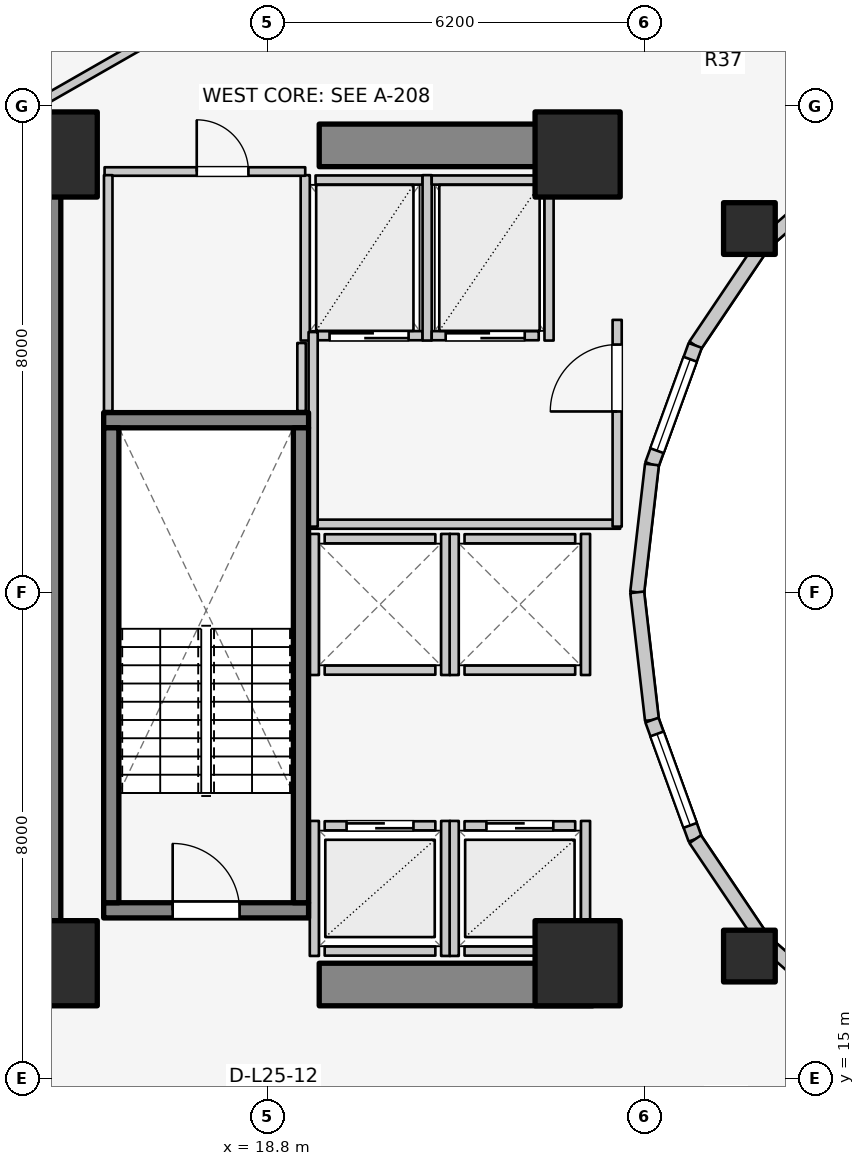
"""IFC4 building model, lengths in metres.
Left out: names, types, materials, properties, quantities, classifications, styles, units other than length and angle.
Written with IfcOpenShell. Run it as: python <this file> out.ifc"""

import sys

from ifc_helpers import new_model, si_unit, direction, frame, frame_2d, origin, origin_2d, place, context, subcontext, project, spatial, rectangle, extrude, element, fill, save


model = new_model("IFC4")
c1 = context("Model", 3, precision=1e-05, world=origin(), true_north=direction((0.0, 1.0)))
c2 = subcontext(c1, "Body", "Model", "MODEL_VIEW")
j1 = project(units=[si_unit("LENGTHUNIT", "METRE"), si_unit("PLANEANGLEUNIT", "RADIAN")], contexts=[c1])
p1 = place(None, origin())
s1 = spatial("IfcSite", under=j1, at=p1, CompositionType="ELEMENT")
p2 = place(p1, origin())
s2 = spatial("IfcBuilding", under=s1, at=p2, CompositionType="ELEMENT")
p3 = place(p2, frame((0.0, 0.0, 85.6)))
s3 = spatial("IfcBuildingStorey", under=s2, at=p3, CompositionType="ELEMENT", Elevation=85.6)
p4 = place(p3, frame((15.05, 17.05, 0.0), z_axis=(0.0, 0.0, 1.0), x_axis=(0.0, 1.0, 0.0)))
e1 = element("IfcWall", 1, at=p4, inside=s3, PredefinedType="SHEAR", context=c2, shape_type="SweptSolid", body=[
    extrude(rectangle(XDim=12.8, YDim=0.7, at=frame_2d((6.4, 0.0))), origin(), (0.0, 0.0, 1.0), 3.1),
])
for number, where, z_axis, x_axis in (
    (2, (19.65, 16.55, 0.0), (0.0, 0.0, 1.0), (1.0, 0.0, 0.0)),
    (3, (19.65, 30.35, 0.0), (0.0, 0.0, 1.0), (1.0, 0.0, 0.0)),
):
    element("IfcWall", number, at=place(p3, frame(where, z_axis=z_axis, x_axis=x_axis)), inside=s3, PredefinedType="SHEAR", context=c2, shape_type="SweptSolid", body=[
        extrude(rectangle(XDim=4.5, YDim=0.7, at=frame_2d((2.25, 0.0))), origin(), (0.0, 0.0, 1.0), 3.1),
    ])
p5 = place(p3, frame((16.105, 17.77, 0.0), z_axis=(0.0, 0.0, 1.0), x_axis=(1.0, 0.0, 0.0)))
e4 = element("IfcWall", 4, at=p5, inside=s3, PredefinedType="SOLIDWALL", context=c2, shape_type="SweptSolid", body=[
    extrude(rectangle(XDim=3.37, YDim=0.25, at=frame_2d((1.685, 0.0))), origin(), (0.0, 0.0, 1.0), 3.1),
])
p6 = place(p5, frame((1.135, 0.0, 0.0)))
e5 = element("IfcOpeningElement", 5, at=p6, cuts=e4, PredefinedType="OPENING", context=c2, shape_type="SweptSolid", body=[
    extrude(rectangle(XDim=1.1, YDim=2.1, at=frame_2d((0.55, 1.05))), frame((0.0, 0.135, 0.0), z_axis=(0.0, -1.0, 0.0), x_axis=(1.0, 0.0, 0.0)), (0.0, 0.0, 1.0), 0.27),
])
p7 = place(p3, frame((16.105, 25.83, 0.0), z_axis=(0.0, 0.0, 1.0), x_axis=(1.0, 0.0, 0.0)))
e6 = element("IfcWall", 6, at=p7, inside=s3, PredefinedType="SOLIDWALL", context=c2, shape_type="SweptSolid", body=[
    extrude(rectangle(XDim=3.37, YDim=0.25, at=frame_2d((1.685, 0.0))), origin(), (0.0, 0.0, 1.0), 3.1),
])
for number, where, z_axis, x_axis in (
    (7, (16.23, 17.895, 0.0), (0.0, 0.0, 1.0), (0.0, 1.0, 0.0)),
    (8, (19.35, 17.895, 0.0), (0.0, 0.0, 1.0), (0.0, 1.0, 0.0)),
):
    element("IfcWall", number, at=place(p3, frame(where, z_axis=z_axis, x_axis=x_axis)), inside=s3, PredefinedType="SOLIDWALL", context=c2, shape_type="SweptSolid", body=[
        extrude(rectangle(XDim=7.81, YDim=0.25, at=frame_2d((3.905, 0.0))), origin(), (0.0, 0.0, 1.0), 3.1),
    ])
for number, where, z_axis, x_axis in (
    (9, (15.3, 16.9, 0.0), (0.0, 0.0, 1.0), (1.0, 0.0, 0.0)),
    (10, (23.9, 16.9, 0.0), (0.0, 0.0, 1.0), (1.0, 0.0, 0.0)),
    (11, (23.9, 30.2, 0.0), (0.0, 0.0, 1.0), (1.0, 0.0, 0.0)),
    (12, (15.3, 30.2, 0.0), (0.0, 0.0, 1.0), (1.0, 0.0, 0.0)),
):
    element("IfcColumn", number, at=place(p3, frame(where, z_axis=z_axis, x_axis=x_axis)), inside=s3, PredefinedType="COLUMN", context=c2, shape_type="SweptSolid", body=[
        extrude(rectangle(XDim=1.4, YDim=1.4, at=origin_2d()), origin(), (0.0, 0.0, 1.0), 3.1),
    ])
for number, where, z_axis, x_axis in (
    (13, (26.725, 28.982, 0.0), (0.0, 0.0, 1.0), (1.0, 0.0, 0.0)),
    (14, (26.725, 17.018, 0.0), (0.0, 0.0, 1.0), (1.0, 0.0, 0.0)),
):
    element("IfcColumn", number, at=place(p3, frame(where, z_axis=z_axis, x_axis=x_axis)), inside=s3, PredefinedType="COLUMN", context=c2, shape_type="SweptSolid", body=[
        extrude(rectangle(XDim=0.85, YDim=0.85, at=origin_2d()), origin(), (0.0, 0.0, 1.0), 3.1),
    ])
p8 = place(p3, frame((28.44, 30.032, 0.0), z_axis=(0.0, 0.0, 1.0), x_axis=(-0.752576694707, -0.658504607869, 0.0)))
e15 = element("IfcWall", 15, at=p8, inside=s3, PredefinedType="STANDARD", context=c2, shape_type="SweptSolid", body=[
    extrude(rectangle(XDim=1.959, YDim=0.23, at=frame_2d((0.98, 0.0))), origin(), (0.0, 0.0, 1.0), 2.16),
])
p9 = place(p3, frame((26.965, 28.742, 0.0), z_axis=(0.0, 0.0, 1.0), x_axis=(-0.558197800898, -0.829707909492, 0.0)))
e16 = element("IfcWall", 16, at=p9, inside=s3, PredefinedType="STANDARD", context=c2, shape_type="SweptSolid", body=[
    extrude(rectangle(XDim=2.027, YDim=0.23, at=frame_2d((1.013, 0.0))), origin(), (0.0, 0.0, 1.0), 2.16),
])
p10 = place(p3, frame((25.834, 27.06, 0.0), z_axis=(0.0, 0.0, 1.0), x_axis=(-0.341423187295, -0.93990968033, 0.0)))
e17 = element("IfcWall", 17, at=p10, inside=s3, PredefinedType="STANDARD", context=c2, shape_type="SweptSolid", body=[
    extrude(rectangle(XDim=2.084, YDim=0.23, at=frame_2d((1.042, 0.0))), origin(), (0.0, 0.0, 1.0), 2.84),
])
p11 = place(p10, frame((0.242, 0.0, 0.85)))
e18 = element("IfcOpeningElement", 18, at=p11, cuts=e17, PredefinedType="OPENING", context=c2, shape_type="SweptSolid", body=[
    extrude(rectangle(XDim=1.6, YDim=1.65, at=frame_2d((0.8, 0.825))), frame((0.0, 0.125, 0.0), z_axis=(0.0, -1.0, 0.0), x_axis=(1.0, 0.0, 0.0)), (0.0, 0.0, 1.0), 0.25),
])
for number, where, z_axis, x_axis in (
    (19, (25.123, 25.102, 0.0), (0.0, 0.0, 1.0), (-0.115, -0.993, 0.0)),
    (20, (24.88, 23.0, 0.0), (0.0, 0.0, 1.0), (0.115, -0.993, 0.0)),
):
    element("IfcWall", number, at=place(p3, frame(where, z_axis=z_axis, x_axis=x_axis)), inside=s3, PredefinedType="STANDARD", context=c2, shape_type="SweptSolid", body=[
        extrude(rectangle(XDim=2.115, YDim=0.23, at=frame_2d((1.058, 0.0))), origin(), (0.0, 0.0, 1.0), 2.84),
    ])
p12 = place(p3, frame((25.123, 20.898, 0.0), z_axis=(0.0, 0.0, 1.0), x_axis=(0.341423187295, -0.93990968033, 0.0)))
e21 = element("IfcWall", 21, at=p12, inside=s3, PredefinedType="STANDARD", context=c2, shape_type="SweptSolid", body=[
    extrude(rectangle(XDim=2.084, YDim=0.23, at=frame_2d((1.042, 0.0))), origin(), (0.0, 0.0, 1.0), 2.84),
])
p13 = place(p12, frame((0.242, 0.0, 0.85)))
e22 = element("IfcOpeningElement", 22, at=p13, cuts=e21, PredefinedType="OPENING", context=c2, shape_type="SweptSolid", body=[
    extrude(rectangle(XDim=1.6, YDim=1.65, at=frame_2d((0.8, 0.825))), frame((0.0, 0.125, 0.0), z_axis=(0.0, -1.0, 0.0), x_axis=(1.0, 0.0, 0.0)), (0.0, 0.0, 1.0), 0.25),
])
p14 = place(p3, frame((25.834, 18.94, 0.0), z_axis=(0.0, 0.0, 1.0), x_axis=(0.558197800898, -0.829707909492, 0.0)))
e23 = element("IfcWall", 23, at=p14, inside=s3, PredefinedType="STANDARD", context=c2, shape_type="SweptSolid", body=[
    extrude(rectangle(XDim=2.027, YDim=0.23, at=frame_2d((1.013, 0.0))), origin(), (0.0, 0.0, 1.0), 2.16),
])
p15 = place(p3, frame((26.965, 17.258, 0.0), z_axis=(0.0, 0.0, 1.0), x_axis=(0.752576694707, -0.658504607869, 0.0)))
e24 = element("IfcWall", 24, at=p15, inside=s3, PredefinedType="STANDARD", context=c2, shape_type="SweptSolid", body=[
    extrude(rectangle(XDim=1.959, YDim=0.23, at=frame_2d((0.98, 0.0))), origin(), (0.0, 0.0, 1.0), 2.16),
])
p16 = place(p3, frame((19.74, 19.16, 0.0), z_axis=(0.0, 0.0, 1.0), x_axis=(1.0, 0.0, 0.0)))
e25 = element("IfcWall", 25, at=p16, inside=s3, PredefinedType="SOLIDWALL", context=c2, shape_type="SweptSolid", body=[
    extrude(rectangle(XDim=1.82, YDim=0.15, at=frame_2d((0.91, 0.0))), origin(), (0.0, 0.0, 1.0), 2.855),
])
p17 = place(p16, frame((0.36, 0.0, 0.0)))
e26 = element("IfcOpeningElement", 26, at=p17, cuts=e25, PredefinedType="OPENING", context=c2, shape_type="SweptSolid", body=[
    extrude(rectangle(XDim=1.1, YDim=2.1, at=frame_2d((0.55, 1.05))), frame((0.0, 0.085, 0.0), z_axis=(0.0, -1.0, 0.0), x_axis=(1.0, 0.0, 0.0)), (0.0, 0.0, 1.0), 0.17),
])
p18 = place(p3, frame((19.74, 17.1, 0.0), z_axis=(0.0, 0.0, 1.0), x_axis=(1.0, 0.0, 0.0)))
e27 = element("IfcWall", 27, at=p18, inside=s3, PredefinedType="SOLIDWALL", context=c2, shape_type="SweptSolid", body=[
    extrude(rectangle(XDim=1.82, YDim=0.15, at=frame_2d((0.91, 0.0))), origin(), (0.0, 0.0, 1.0), 2.855),
])
p19 = place(p3, frame((19.57, 17.02, 0.0), z_axis=(0.0, 0.0, 1.0), x_axis=(0.0, 1.0, 0.0)))
e28 = element("IfcWall", 28, at=p19, inside=s3, PredefinedType="SOLIDWALL", context=c2, shape_type="SweptSolid", body=[
    extrude(rectangle(XDim=2.22, YDim=0.15, at=frame_2d((1.11, 0.0))), origin(), (0.0, 0.0, 1.0), 2.12),
])
p20 = place(p3, frame((21.73, 17.02, 0.0), z_axis=(0.0, 0.0, 1.0), x_axis=(0.0, 1.0, 0.0)))
e29 = element("IfcWall", 29, at=p20, inside=s3, PredefinedType="SOLIDWALL", context=c2, shape_type="SweptSolid", body=[
    extrude(rectangle(XDim=2.22, YDim=0.15, at=frame_2d((1.11, 0.0))), origin(), (0.0, 0.0, 1.0), 2.855),
])
p21 = place(p3, frame((22.04, 19.16, 0.0), z_axis=(0.0, 0.0, 1.0), x_axis=(1.0, 0.0, 0.0)))
e30 = element("IfcWall", 30, at=p21, inside=s3, PredefinedType="SOLIDWALL", context=c2, shape_type="SweptSolid", body=[
    extrude(rectangle(XDim=1.82, YDim=0.15, at=frame_2d((0.91, 0.0))), origin(), (0.0, 0.0, 1.0), 2.12),
])
p22 = place(p21, frame((0.36, 0.0, 0.0)))
e31 = element("IfcOpeningElement", 31, at=p22, cuts=e30, PredefinedType="OPENING", context=c2, shape_type="SweptSolid", body=[
    extrude(rectangle(XDim=1.1, YDim=2.1, at=frame_2d((0.55, 1.05))), frame((0.0, 0.085, 0.0), z_axis=(0.0, -1.0, 0.0), x_axis=(1.0, 0.0, 0.0)), (0.0, 0.0, 1.0), 0.17),
])
p23 = place(p3, frame((22.04, 17.1, 0.0), z_axis=(0.0, 0.0, 1.0), x_axis=(1.0, 0.0, 0.0)))
e32 = element("IfcWall", 32, at=p23, inside=s3, PredefinedType="SOLIDWALL", context=c2, shape_type="SweptSolid", body=[
    extrude(rectangle(XDim=1.82, YDim=0.15, at=frame_2d((0.91, 0.0))), origin(), (0.0, 0.0, 1.0), 2.12),
])
p24 = place(p3, frame((21.87, 17.02, 0.0), z_axis=(0.0, 0.0, 1.0), x_axis=(0.0, 1.0, 0.0)))
e33 = element("IfcWall", 33, at=p24, inside=s3, PredefinedType="SOLIDWALL", context=c2, shape_type="SweptSolid", body=[
    extrude(rectangle(XDim=2.22, YDim=0.15, at=frame_2d((1.11, 0.0))), origin(), (0.0, 0.0, 1.0), 2.855),
])
p25 = place(p3, frame((24.03, 17.02, 0.0), z_axis=(0.0, 0.0, 1.0), x_axis=(0.0, 1.0, 0.0)))
e34 = element("IfcWall", 34, at=p25, inside=s3, PredefinedType="SOLIDWALL", context=c2, shape_type="SweptSolid", body=[
    extrude(rectangle(XDim=2.22, YDim=0.15, at=frame_2d((1.11, 0.0))), origin(), (0.0, 0.0, 1.0), 2.12),
])
for number, where, z_axis, x_axis in (
    (35, (19.74, 21.72, 0.0), (0.0, 0.0, 1.0), (1.0, 0.0, 0.0)),
    (36, (19.74, 23.88, 0.0), (0.0, 0.0, 1.0), (1.0, 0.0, 0.0)),
):
    element("IfcWall", number, at=place(p3, frame(where, z_axis=z_axis, x_axis=x_axis)), inside=s3, PredefinedType="SOLIDWALL", context=c2, shape_type="SweptSolid", body=[
        extrude(rectangle(XDim=1.82, YDim=0.15, at=frame_2d((0.91, 0.0))), origin(), (0.0, 0.0, 1.0), 2.855),
    ])
for number, where, z_axis, x_axis in (
    (37, (19.57, 21.64, 0.0), (0.0, 0.0, 1.0), (0.0, 1.0, 0.0)),
    (38, (21.73, 21.64, 0.0), (0.0, 0.0, 1.0), (0.0, 1.0, 0.0)),
):
    element("IfcWall", number, at=place(p3, frame(where, z_axis=z_axis, x_axis=x_axis)), inside=s3, PredefinedType="SOLIDWALL", context=c2, shape_type="SweptSolid", body=[
        extrude(rectangle(XDim=2.32, YDim=0.15, at=frame_2d((1.16, 0.0))), origin(), (0.0, 0.0, 1.0), 2.855),
    ])
for number, where, z_axis, x_axis in (
    (39, (22.04, 21.72, 0.0), (0.0, 0.0, 1.0), (1.0, 0.0, 0.0)),
    (40, (22.04, 23.88, 0.0), (0.0, 0.0, 1.0), (1.0, 0.0, 0.0)),
):
    element("IfcWall", number, at=place(p3, frame(where, z_axis=z_axis, x_axis=x_axis)), inside=s3, PredefinedType="SOLIDWALL", context=c2, shape_type="SweptSolid", body=[
        extrude(rectangle(XDim=1.82, YDim=0.15, at=frame_2d((0.91, 0.0))), origin(), (0.0, 0.0, 1.0), 2.12),
    ])
p26 = place(p3, frame((21.87, 21.64, 0.0), z_axis=(0.0, 0.0, 1.0), x_axis=(0.0, 1.0, 0.0)))
e41 = element("IfcWall", 41, at=p26, inside=s3, PredefinedType="SOLIDWALL", context=c2, shape_type="SweptSolid", body=[
    extrude(rectangle(XDim=2.32, YDim=0.15, at=frame_2d((1.16, 0.0))), origin(), (0.0, 0.0, 1.0), 2.855),
])
p27 = place(p3, frame((24.03, 21.64, 0.0), z_axis=(0.0, 0.0, 1.0), x_axis=(0.0, 1.0, 0.0)))
e42 = element("IfcWall", 42, at=p27, inside=s3, PredefinedType="SOLIDWALL", context=c2, shape_type="SweptSolid", body=[
    extrude(rectangle(XDim=2.32, YDim=0.15, at=frame_2d((1.16, 0.0))), origin(), (0.0, 0.0, 1.0), 2.12),
])
p28 = place(p3, frame((19.59, 27.22, 0.0), z_axis=(0.0, 0.0, 1.0), x_axis=(1.0, 0.0, 0.0)))
e43 = element("IfcWall", 43, at=p28, inside=s3, PredefinedType="SOLIDWALL", context=c2, shape_type="SweptSolid", body=[
    extrude(rectangle(XDim=1.76, YDim=0.15, at=frame_2d((0.88, 0.0))), origin(), (0.0, 0.0, 1.0), 2.855),
])
p29 = place(p28, frame((0.23, 0.0, 0.0)))
e44 = element("IfcOpeningElement", 44, at=p29, cuts=e43, PredefinedType="OPENING", context=c2, shape_type="SweptSolid", body=[
    extrude(rectangle(XDim=1.3, YDim=2.1, at=frame_2d((0.65, 1.05))), frame((0.0, 0.085, 0.0), z_axis=(0.0, -1.0, 0.0), x_axis=(1.0, 0.0, 0.0)), (0.0, 0.0, 1.0), 0.17),
])
p30 = place(p3, frame((19.59, 29.78, 0.0), z_axis=(0.0, 0.0, 1.0), x_axis=(1.0, 0.0, 0.0)))
e45 = element("IfcWall", 45, at=p30, inside=s3, PredefinedType="SOLIDWALL", context=c2, shape_type="SweptSolid", body=[
    extrude(rectangle(XDim=1.76, YDim=0.15, at=frame_2d((0.88, 0.0))), origin(), (0.0, 0.0, 1.0), 2.855),
])
for number, where, z_axis, x_axis in (
    (46, (19.42, 27.14, 0.0), (0.0, 0.0, 1.0), (0.0, 1.0, 0.0)),
    (47, (21.425, 27.14, 0.0), (0.0, 0.0, 1.0), (0.0, 1.0, 0.0)),
):
    element("IfcWall", number, at=place(p3, frame(where, z_axis=z_axis, x_axis=x_axis)), inside=s3, PredefinedType="SOLIDWALL", context=c2, shape_type="SweptSolid", body=[
        extrude(rectangle(XDim=2.72, YDim=0.15, at=frame_2d((1.36, 0.0))), origin(), (0.0, 0.0, 1.0), 2.855),
    ])
p31 = place(p3, frame((21.5, 27.22, 0.0), z_axis=(0.0, 0.0, 1.0), x_axis=(1.0, 0.0, 0.0)))
e48 = element("IfcWall", 48, at=p31, inside=s3, PredefinedType="SOLIDWALL", context=c2, shape_type="SweptSolid", body=[
    extrude(rectangle(XDim=1.76, YDim=0.15, at=frame_2d((0.88, 0.0))), origin(), (0.0, 0.0, 1.0), 2.855),
])
p32 = place(p31, frame((0.23, 0.0, 0.0)))
e49 = element("IfcOpeningElement", 49, at=p32, cuts=e48, PredefinedType="OPENING", context=c2, shape_type="SweptSolid", body=[
    extrude(rectangle(XDim=1.3, YDim=2.1, at=frame_2d((0.65, 1.05))), frame((0.0, 0.085, 0.0), z_axis=(0.0, -1.0, 0.0), x_axis=(1.0, 0.0, 0.0)), (0.0, 0.0, 1.0), 0.17),
])
p33 = place(p3, frame((21.5, 29.78, 0.0), z_axis=(0.0, 0.0, 1.0), x_axis=(1.0, 0.0, 0.0)))
e50 = element("IfcWall", 50, at=p33, inside=s3, PredefinedType="SOLIDWALL", context=c2, shape_type="SweptSolid", body=[
    extrude(rectangle(XDim=1.76, YDim=0.15, at=frame_2d((0.88, 0.0))), origin(), (0.0, 0.0, 1.0), 2.855),
])
p34 = place(p3, frame((23.43, 27.14, 0.0), z_axis=(0.0, 0.0, 1.0), x_axis=(0.0, 1.0, 0.0)))
e51 = element("IfcWall", 51, at=p34, inside=s3, PredefinedType="SOLIDWALL", context=c2, shape_type="SweptSolid", body=[
    extrude(rectangle(XDim=2.72, YDim=0.15, at=frame_2d((1.36, 0.0))), origin(), (0.0, 0.0, 1.0), 2.855),
])
p35 = place(p3, frame((19.52, 24.12, 0.0), z_axis=(0.0, 0.0, 1.0), x_axis=(1.0, 0.0, 0.0)))
e52 = element("IfcWall", 52, at=p35, inside=s3, PredefinedType="PARTITIONING", context=c2, shape_type="SweptSolid", body=[
    extrude(rectangle(XDim=5.08, YDim=0.15, at=frame_2d((2.54, 0.0))), origin(), (0.0, 0.0, 1.0), 2.12),
])
p36 = place(p3, frame((19.55, 24.08, 0.0), z_axis=(0.0, 0.0, 1.0), x_axis=(0.0, 1.0, 0.0)))
e53 = element("IfcWall", 53, at=p36, inside=s3, PredefinedType="PARTITIONING", context=c2, shape_type="SweptSolid", body=[
    extrude(rectangle(XDim=3.2, YDim=0.15, at=frame_2d((1.6, 0.0))), origin(), (0.0, 0.0, 1.0), 2.855),
])
p37 = place(p3, frame((24.55, 24.08, 0.0), z_axis=(0.0, 0.0, 1.0), x_axis=(0.0, 1.0, 0.0)))
e54 = element("IfcWall", 54, at=p37, inside=s3, PredefinedType="PARTITIONING", context=c2, shape_type="SweptSolid", body=[
    extrude(rectangle(XDim=3.4, YDim=0.15, at=frame_2d((1.7, 0.0))), origin(), (0.0, 0.0, 1.0), 2.855),
])
p38 = place(p37, frame((1.894, 0.0, 0.0)))
e55 = element("IfcOpeningElement", 55, at=p38, cuts=e54, PredefinedType="OPENING", context=c2, shape_type="SweptSolid", body=[
    extrude(rectangle(XDim=1.1, YDim=2.1, at=frame_2d((0.55, 1.05))), frame((0.0, 0.085, 0.0), z_axis=(0.0, -1.0, 0.0), x_axis=(1.0, 0.0, 0.0)), (0.0, 0.0, 1.0), 0.17),
])
p39 = place(p3, frame((16.12, 29.92, 0.0), z_axis=(0.0, 0.0, 1.0), x_axis=(1.0, 0.0, 0.0)))
e56 = element("IfcWall", 56, at=p39, inside=s3, PredefinedType="PLUMBINGWALL", context=c2, shape_type="SweptSolid", body=[
    extrude(rectangle(XDim=3.3, YDim=0.14, at=frame_2d((1.65, 0.0))), origin(), (0.0, 0.0, 1.0), 2.855),
])
p40 = place(p39, frame((1.516, 0.0, 0.0)))
e57 = element("IfcOpeningElement", 57, at=p40, cuts=e56, PredefinedType="OPENING", context=c2, shape_type="SweptSolid", body=[
    extrude(rectangle(XDim=0.85, YDim=2.05, at=frame_2d((0.425, 1.025))), frame((0.0, 0.08, 0.0), z_axis=(0.0, -1.0, 0.0), x_axis=(1.0, 0.0, 0.0)), (0.0, 0.0, 1.0), 0.16),
])
p41 = place(p3, frame((16.18, 25.98, 0.0), z_axis=(0.0, 0.0, 1.0), x_axis=(0.0, 1.0, 0.0)))
e58 = element("IfcWall", 58, at=p41, inside=s3, PredefinedType="PLUMBINGWALL", context=c2, shape_type="SweptSolid", body=[
    extrude(rectangle(XDim=3.88, YDim=0.14, at=frame_2d((1.94, 0.0))), origin(), (0.0, 0.0, 1.0), 2.855),
])
p42 = place(p3, frame((19.36, 25.98, 0.0), z_axis=(0.0, 0.0, 1.0), x_axis=(0.0, 1.0, 0.0)))
e59 = element("IfcWall", 59, at=p42, inside=s3, PredefinedType="PLUMBINGWALL", context=c2, shape_type="SweptSolid", body=[
    extrude(rectangle(XDim=1.12, YDim=0.14, at=frame_2d((0.56, 0.0))), origin(), (0.0, 0.0, 1.0), 2.855),
])
p43 = place(p3, frame((17.243, 32.305, 0.0), z_axis=(0.0, 0.0, 1.0), x_axis=(-0.867991349648, -0.496579315857, 0.0)))
e60 = element("IfcWall", 60, at=p43, inside=s3, PredefinedType="PARTITIONING", context=c2, shape_type="SweptSolid", body=[
    extrude(rectangle(XDim=2.567, YDim=0.15, at=frame_2d((1.283, 0.0))), origin(), (0.0, 0.0, 1.0), 2.142),
])
p44 = place(p11, origin())
e61 = element("IfcWindow", 61, at=p44, inside=s3, PartitioningType="SINGLE_PANEL", PredefinedType="WINDOW", context=c2, shape_type="SweptSolid", body=[
    extrude(rectangle(XDim=1.6, YDim=1.65, at=frame_2d((0.8, 0.825))), frame((0.0, 0.03, 0.0), z_axis=(0.0, -1.0, 0.0), x_axis=(1.0, 0.0, 0.0)), (0.0, 0.0, 1.0), 0.06),
])
fill(e18, e61)
p45 = place(p13, origin())
e62 = element("IfcWindow", 62, at=p45, inside=s3, PartitioningType="SINGLE_PANEL", PredefinedType="WINDOW", context=c2, shape_type="SweptSolid", body=[
    extrude(rectangle(XDim=1.6, YDim=1.65, at=frame_2d((0.8, 0.825))), frame((0.0, 0.03, 0.0), z_axis=(0.0, -1.0, 0.0), x_axis=(1.0, 0.0, 0.0)), (0.0, 0.0, 1.0), 0.06),
])
fill(e22, e62)
p46 = place(p6, origin())
e63 = element("IfcDoor", 63, at=p46, inside=s3, OperationType="SINGLE_SWING_LEFT", PredefinedType="DOOR", context=c2, shape_type="SweptSolid", body=[
    extrude(rectangle(XDim=1.1, YDim=2.1, at=frame_2d((0.55, 1.05))), frame((0.0, 0.025, 0.0), z_axis=(0.0, -1.0, 0.0), x_axis=(1.0, 0.0, 0.0)), (0.0, 0.0, 1.0), 0.05),
])
fill(e5, e63)
p47 = place(p17, origin())
e64 = element("IfcDoor", 64, at=p47, inside=s3, OperationType="DOUBLE_DOOR_SLIDING", PredefinedType="DOOR", context=c2, shape_type="SweptSolid", body=[
    extrude(rectangle(XDim=1.1, YDim=2.1, at=frame_2d((0.55, 1.05))), frame((0.0, 0.025, 0.0), z_axis=(0.0, -1.0, 0.0), x_axis=(1.0, 0.0, 0.0)), (0.0, 0.0, 1.0), 0.05),
])
fill(e26, e64)
p48 = place(p22, origin())
e65 = element("IfcDoor", 65, at=p48, inside=s3, OperationType="DOUBLE_DOOR_SLIDING", PredefinedType="DOOR", context=c2, shape_type="SweptSolid", body=[
    extrude(rectangle(XDim=1.1, YDim=2.1, at=frame_2d((0.55, 1.05))), frame((0.0, 0.025, 0.0), z_axis=(0.0, -1.0, 0.0), x_axis=(1.0, 0.0, 0.0)), (0.0, 0.0, 1.0), 0.05),
])
fill(e31, e65)
p49 = place(p29, origin())
e66 = element("IfcDoor", 66, at=p49, inside=s3, OperationType="DOUBLE_DOOR_SLIDING", PredefinedType="DOOR", context=c2, shape_type="SweptSolid", body=[
    extrude(rectangle(XDim=1.3, YDim=2.1, at=frame_2d((0.65, 1.05))), frame((0.0, 0.025, 0.0), z_axis=(0.0, -1.0, 0.0), x_axis=(1.0, 0.0, 0.0)), (0.0, 0.0, 1.0), 0.05),
])
fill(e44, e66)
p50 = place(p32, origin())
e67 = element("IfcDoor", 67, at=p50, inside=s3, OperationType="DOUBLE_DOOR_SLIDING", PredefinedType="DOOR", context=c2, shape_type="SweptSolid", body=[
    extrude(rectangle(XDim=1.3, YDim=2.1, at=frame_2d((0.65, 1.05))), frame((0.0, 0.025, 0.0), z_axis=(0.0, -1.0, 0.0), x_axis=(1.0, 0.0, 0.0)), (0.0, 0.0, 1.0), 0.05),
])
fill(e49, e67)
p51 = place(p38, origin())
e68 = element("IfcDoor", 68, at=p51, inside=s3, OperationType="SINGLE_SWING_LEFT", PredefinedType="DOOR", context=c2, shape_type="SweptSolid", body=[
    extrude(rectangle(XDim=1.1, YDim=2.1, at=frame_2d((0.55, 1.05))), frame((0.0, 0.025, 0.0), z_axis=(0.0, -1.0, 0.0), x_axis=(1.0, 0.0, 0.0)), (0.0, 0.0, 1.0), 0.05),
])
fill(e55, e68)
p52 = place(p40, origin())
e69 = element("IfcDoor", 69, at=p52, inside=s3, OperationType="SINGLE_SWING_LEFT", PredefinedType="DOOR", context=c2, shape_type="SweptSolid", body=[
    extrude(rectangle(XDim=0.85, YDim=2.05, at=frame_2d((0.425, 1.025))), frame((0.0, 0.025, 0.0), z_axis=(0.0, -1.0, 0.0), x_axis=(1.0, 0.0, 0.0)), (0.0, 0.0, 1.0), 0.05),
])
fill(e57, e69)
save(model, sys.argv[1])
